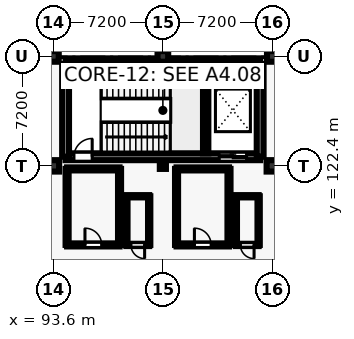
"""IFC4 building model, lengths in metres.
Left out: names, types, materials, properties, quantities, classifications, styles, units other than length and angle.
Written with IfcOpenShell. Run it as: python <this file> out.ifc"""

import sys

from ifc_helpers import new_model, si_unit, direction, frame, frame_2d, origin, origin_2d, place, context, subcontext, project, spatial, rectangle, hollow_rectangle, extrude, element, fill, save


model = new_model("IFC4")
c1 = context("Model", 3, precision=1e-05, world=origin(), true_north=direction((0.0, 1.0)))
c2 = subcontext(c1, "Body", "Model", "MODEL_VIEW")
j1 = project(units=[si_unit("LENGTHUNIT", "METRE"), si_unit("PLANEANGLEUNIT", "RADIAN")], contexts=[c1])
p1 = place(None, origin())
s1 = spatial("IfcSite", under=j1, at=p1, CompositionType="ELEMENT")
p2 = place(p1, origin())
s2 = spatial("IfcBuilding", under=s1, at=p2, CompositionType="ELEMENT")
p3 = place(p2, frame((0.0, 0.0, 9.6)))
s3 = spatial("IfcBuildingStorey", under=s2, at=p3, CompositionType="ELEMENT", Elevation=9.6)
p4 = place(p3, frame((93.6, 122.4, 0.0), z_axis=(0.0, 0.0, 1.0), x_axis=(1.0, 0.0, 0.0)))
e1 = element("IfcColumn", 1, at=p4, inside=s3, PredefinedType="COLUMN", context=c2, shape_type="SweptSolid", body=[
    extrude(rectangle(XDim=0.75, YDim=0.75, at=origin_2d()), origin(), (0.0, 0.0, 1.0), 4.2),
])
p5 = place(p3, frame((93.6, 129.6, 0.0), z_axis=(0.0, 0.0, 1.0), x_axis=(1.0, 0.0, 0.0)))
e2 = element("IfcColumn", 2, at=p5, inside=s3, PredefinedType="COLUMN", context=c2, shape_type="SweptSolid", body=[
    extrude(rectangle(XDim=0.7, YDim=0.7, at=origin_2d()), origin(), (0.0, 0.0, 1.0), 4.2),
])
p6 = place(p3, frame((100.8, 122.4, 0.0), z_axis=(0.0, 0.0, 1.0), x_axis=(1.0, 0.0, 0.0)))
e3 = element("IfcColumn", 3, at=p6, inside=s3, PredefinedType="COLUMN", context=c2, shape_type="SweptSolid", body=[
    extrude(hollow_rectangle(XDim=0.4, YDim=0.4, WallThickness=0.02, at=origin_2d()), origin(), (0.0, 0.0, 1.0), 4.2),
])
p7 = place(p3, frame((100.8, 129.6, 0.0), z_axis=(0.0, 0.0, 1.0), x_axis=(1.0, 0.0, 0.0)))
e4 = element("IfcColumn", 4, at=p7, inside=s3, PredefinedType="COLUMN", context=c2, shape_type="SweptSolid", body=[
    extrude(rectangle(XDim=0.7, YDim=0.7, at=origin_2d()), origin(), (0.0, 0.0, 1.0), 4.2),
])
p8 = place(p3, frame((108.0, 122.4, 0.0), z_axis=(0.0, 0.0, 1.0), x_axis=(1.0, 0.0, 0.0)))
e5 = element("IfcColumn", 5, at=p8, inside=s3, PredefinedType="COLUMN", context=c2, shape_type="SweptSolid", body=[
    extrude(rectangle(XDim=0.75, YDim=0.75, at=origin_2d()), origin(), (0.0, 0.0, 1.0), 4.2),
])
p9 = place(p3, frame((108.0, 129.6, 0.0), z_axis=(0.0, 0.0, 1.0), x_axis=(1.0, 0.0, 0.0)))
e6 = element("IfcColumn", 6, at=p9, inside=s3, PredefinedType="COLUMN", context=c2, shape_type="SweptSolid", body=[
    extrude(rectangle(XDim=0.7, YDim=0.7, at=origin_2d()), origin(), (0.0, 0.0, 1.0), 4.2),
])
p10 = place(p3, frame((94.4, 123.0, 0.0), z_axis=(0.0, 0.0, 1.0), x_axis=(1.0, 0.0, 0.0)))
e7 = element("IfcWall", 7, at=p10, inside=s3, PredefinedType="SHEAR", context=c2, shape_type="SweptSolid", body=[
    extrude(rectangle(XDim=12.8, YDim=0.45, at=frame_2d((6.4, 0.0))), origin(), (0.0, 0.0, 1.0), 3.88),
])
p11 = place(p10, frame((0.55, 0.0, 0.0)))
e8 = element("IfcOpeningElement", 8, at=p11, cuts=e7, PredefinedType="OPENING", context=c2, shape_type="SweptSolid", body=[
    extrude(rectangle(XDim=1.2, YDim=2.25, at=frame_2d((0.6, 1.125))), frame((0.0, 0.235, 0.0), z_axis=(0.0, -1.0, 0.0), x_axis=(1.0, 0.0, 0.0)), (0.0, 0.0, 1.0), 0.47),
])
p12 = place(p10, frame((10.108, 0.0, 0.0)))
e9 = element("IfcOpeningElement", 9, at=p12, cuts=e7, PredefinedType="OPENING", context=c2, shape_type="SweptSolid", body=[
    extrude(rectangle(XDim=1.8, YDim=2.4, at=frame_2d((0.9, 1.2))), frame((0.0, 0.235, 0.0), z_axis=(0.0, -1.0, 0.0), x_axis=(1.0, 0.0, 0.0)), (0.0, 0.0, 1.0), 0.47),
])
p13 = place(p3, frame((94.4, 129.1, 0.0), z_axis=(0.0, 0.0, 1.0), x_axis=(1.0, 0.0, 0.0)))
e10 = element("IfcWall", 10, at=p13, inside=s3, PredefinedType="SHEAR", context=c2, shape_type="SweptSolid", body=[
    extrude(rectangle(XDim=12.8, YDim=0.45, at=frame_2d((6.4, 0.0))), origin(), (0.0, 0.0, 1.0), 3.88),
])
for number, where, z_axis, x_axis in (
    (11, (94.4, 123.0, 0.0), (0.0, 0.0, 1.0), (0.0, 1.0, 0.0)),
    (12, (107.2, 123.0, 0.0), (0.0, 0.0, 1.0), (0.0, 1.0, 0.0)),
):
    element("IfcWall", number, at=place(p3, frame(where, z_axis=z_axis, x_axis=x_axis)), inside=s3, PredefinedType="SHEAR", context=c2, shape_type="SweptSolid", body=[
        extrude(rectangle(XDim=6.1, YDim=0.45, at=frame_2d((3.05, 0.0))), origin(), (0.0, 0.0, 1.0), 3.88),
    ])
p14 = place(p3, frame((103.616, 123.225, 0.0), z_axis=(0.0, 0.0, 1.0), x_axis=(0.0, 1.0, 0.0)))
e13 = element("IfcWall", 13, at=p14, inside=s3, PredefinedType="SHEAR", context=c2, shape_type="SweptSolid", body=[
    extrude(rectangle(XDim=5.65, YDim=0.35, at=frame_2d((2.825, 0.0))), origin(), (0.0, 0.0, 1.0), 3.88),
])
p15 = place(p3, frame((94.5, 117.2, 0.0), z_axis=(0.0, 0.0, 1.0), x_axis=(1.0, 0.0, 0.0)))
e14 = element("IfcWall", 14, at=p15, inside=s3, PredefinedType="PARTITIONING", context=c2, shape_type="SweptSolid", body=[
    extrude(rectangle(XDim=3.45, YDim=0.2, at=frame_2d((1.725, 0.0))), origin(), (0.0, 0.0, 1.0), 2.94),
])
p16 = place(p15, frame((1.175, 0.0, 0.0)))
e15 = element("IfcOpeningElement", 15, at=p16, cuts=e14, PredefinedType="OPENING", context=c2, shape_type="SweptSolid", body=[
    extrude(rectangle(XDim=1.1, YDim=2.25, at=frame_2d((0.55, 1.125))), frame((0.0, 0.11, 0.0), z_axis=(0.0, -1.0, 0.0), x_axis=(1.0, 0.0, 0.0)), (0.0, 0.0, 1.0), 0.22),
])
p17 = place(p3, frame((97.95, 117.2, 0.0), z_axis=(0.0, 0.0, 1.0), x_axis=(0.0, 1.0, 0.0)))
e16 = element("IfcWall", 16, at=p17, inside=s3, PredefinedType="PARTITIONING", context=c2, shape_type="SweptSolid", body=[
    extrude(rectangle(XDim=5.0, YDim=0.2, at=frame_2d((2.5, 0.0))), origin(), (0.0, 0.0, 1.0), 2.94),
])
p18 = place(p3, frame((97.95, 122.2, 0.0), z_axis=(0.0, 0.0, 1.0), x_axis=(-1.0, 0.0, 0.0)))
e17 = element("IfcWall", 17, at=p18, inside=s3, PredefinedType="PARTITIONING", context=c2, shape_type="SweptSolid", body=[
    extrude(rectangle(XDim=3.45, YDim=0.2, at=frame_2d((1.725, 0.0))), origin(), (0.0, 0.0, 1.0), 2.94),
])
p19 = place(p3, frame((94.5, 122.2, 0.0), z_axis=(0.0, 0.0, 1.0), x_axis=(0.0, -1.0, 0.0)))
e18 = element("IfcWall", 18, at=p19, inside=s3, PredefinedType="PARTITIONING", context=c2, shape_type="SweptSolid", body=[
    extrude(rectangle(XDim=5.0, YDim=0.2, at=frame_2d((2.5, 0.0))), origin(), (0.0, 0.0, 1.0), 2.94),
])
p20 = place(p3, frame((98.4, 117.2, 0.0), z_axis=(0.0, 0.0, 1.0), x_axis=(1.0, 0.0, 0.0)))
e19 = element("IfcWall", 19, at=p20, inside=s3, PredefinedType="PARTITIONING", context=c2, shape_type="SweptSolid", body=[
    extrude(rectangle(XDim=1.5, YDim=0.15, at=frame_2d((0.75, 0.0))), origin(), (0.0, 0.0, 1.0), 2.94),
])
p21 = place(p20, frame((0.3, 0.0, 0.0)))
e20 = element("IfcOpeningElement", 20, at=p21, cuts=e19, PredefinedType="OPENING", context=c2, shape_type="SweptSolid", body=[
    extrude(rectangle(XDim=0.9, YDim=2.15, at=frame_2d((0.45, 1.075))), frame((0.0, 0.085, 0.0), z_axis=(0.0, -1.0, 0.0), x_axis=(1.0, 0.0, 0.0)), (0.0, 0.0, 1.0), 0.17),
])
p22 = place(p3, frame((99.9, 117.2, 0.0), z_axis=(0.0, 0.0, 1.0), x_axis=(0.0, 1.0, 0.0)))
e21 = element("IfcWall", 21, at=p22, inside=s3, PredefinedType="PARTITIONING", context=c2, shape_type="SweptSolid", body=[
    extrude(rectangle(XDim=3.2, YDim=0.15, at=frame_2d((1.6, 0.0))), origin(), (0.0, 0.0, 1.0), 2.94),
])
p23 = place(p3, frame((99.9, 120.4, 0.0), z_axis=(0.0, 0.0, 1.0), x_axis=(-1.0, 0.0, 0.0)))
e22 = element("IfcWall", 22, at=p23, inside=s3, PredefinedType="PARTITIONING", context=c2, shape_type="SweptSolid", body=[
    extrude(rectangle(XDim=1.5, YDim=0.15, at=frame_2d((0.75, 0.0))), origin(), (0.0, 0.0, 1.0), 2.94),
])
p24 = place(p3, frame((98.4, 120.4, 0.0), z_axis=(0.0, 0.0, 1.0), x_axis=(0.0, -1.0, 0.0)))
e23 = element("IfcWall", 23, at=p24, inside=s3, PredefinedType="PARTITIONING", context=c2, shape_type="SweptSolid", body=[
    extrude(rectangle(XDim=3.2, YDim=0.15, at=frame_2d((1.6, 0.0))), origin(), (0.0, 0.0, 1.0), 2.94),
])
p25 = place(p3, frame((101.7, 117.2, 0.0), z_axis=(0.0, 0.0, 1.0), x_axis=(1.0, 0.0, 0.0)))
e24 = element("IfcWall", 24, at=p25, inside=s3, PredefinedType="PARTITIONING", context=c2, shape_type="SweptSolid", body=[
    extrude(rectangle(XDim=3.45, YDim=0.2, at=frame_2d((1.725, 0.0))), origin(), (0.0, 0.0, 1.0), 2.94),
])
p26 = place(p25, frame((1.175, 0.0, 0.0)))
e25 = element("IfcOpeningElement", 25, at=p26, cuts=e24, PredefinedType="OPENING", context=c2, shape_type="SweptSolid", body=[
    extrude(rectangle(XDim=1.1, YDim=2.25, at=frame_2d((0.55, 1.125))), frame((0.0, 0.11, 0.0), z_axis=(0.0, -1.0, 0.0), x_axis=(1.0, 0.0, 0.0)), (0.0, 0.0, 1.0), 0.22),
])
p27 = place(p3, frame((105.15, 117.2, 0.0), z_axis=(0.0, 0.0, 1.0), x_axis=(0.0, 1.0, 0.0)))
e26 = element("IfcWall", 26, at=p27, inside=s3, PredefinedType="PARTITIONING", context=c2, shape_type="SweptSolid", body=[
    extrude(rectangle(XDim=5.0, YDim=0.2, at=frame_2d((2.5, 0.0))), origin(), (0.0, 0.0, 1.0), 2.94),
])
p28 = place(p3, frame((105.15, 122.2, 0.0), z_axis=(0.0, 0.0, 1.0), x_axis=(-1.0, 0.0, 0.0)))
e27 = element("IfcWall", 27, at=p28, inside=s3, PredefinedType="PARTITIONING", context=c2, shape_type="SweptSolid", body=[
    extrude(rectangle(XDim=3.45, YDim=0.2, at=frame_2d((1.725, 0.0))), origin(), (0.0, 0.0, 1.0), 2.94),
])
p29 = place(p3, frame((101.7, 122.2, 0.0), z_axis=(0.0, 0.0, 1.0), x_axis=(0.0, -1.0, 0.0)))
e28 = element("IfcWall", 28, at=p29, inside=s3, PredefinedType="PARTITIONING", context=c2, shape_type="SweptSolid", body=[
    extrude(rectangle(XDim=5.0, YDim=0.2, at=frame_2d((2.5, 0.0))), origin(), (0.0, 0.0, 1.0), 2.94),
])
p30 = place(p3, frame((105.6, 117.2, 0.0), z_axis=(0.0, 0.0, 1.0), x_axis=(1.0, 0.0, 0.0)))
e29 = element("IfcWall", 29, at=p30, inside=s3, PredefinedType="PARTITIONING", context=c2, shape_type="SweptSolid", body=[
    extrude(rectangle(XDim=1.5, YDim=0.15, at=frame_2d((0.75, 0.0))), origin(), (0.0, 0.0, 1.0), 2.94),
])
p31 = place(p30, frame((0.3, 0.0, 0.0)))
e30 = element("IfcOpeningElement", 30, at=p31, cuts=e29, PredefinedType="OPENING", context=c2, shape_type="SweptSolid", body=[
    extrude(rectangle(XDim=0.9, YDim=2.15, at=frame_2d((0.45, 1.075))), frame((0.0, 0.085, 0.0), z_axis=(0.0, -1.0, 0.0), x_axis=(1.0, 0.0, 0.0)), (0.0, 0.0, 1.0), 0.17),
])
p32 = place(p3, frame((107.1, 117.2, 0.0), z_axis=(0.0, 0.0, 1.0), x_axis=(0.0, 1.0, 0.0)))
e31 = element("IfcWall", 31, at=p32, inside=s3, PredefinedType="PARTITIONING", context=c2, shape_type="SweptSolid", body=[
    extrude(rectangle(XDim=3.2, YDim=0.15, at=frame_2d((1.6, 0.0))), origin(), (0.0, 0.0, 1.0), 2.94),
])
p33 = place(p3, frame((107.1, 120.4, 0.0), z_axis=(0.0, 0.0, 1.0), x_axis=(-1.0, 0.0, 0.0)))
e32 = element("IfcWall", 32, at=p33, inside=s3, PredefinedType="PARTITIONING", context=c2, shape_type="SweptSolid", body=[
    extrude(rectangle(XDim=1.5, YDim=0.15, at=frame_2d((0.75, 0.0))), origin(), (0.0, 0.0, 1.0), 2.94),
])
p34 = place(p3, frame((105.6, 120.4, 0.0), z_axis=(0.0, 0.0, 1.0), x_axis=(0.0, -1.0, 0.0)))
e33 = element("IfcWall", 33, at=p34, inside=s3, PredefinedType="PARTITIONING", context=c2, shape_type="SweptSolid", body=[
    extrude(rectangle(XDim=3.2, YDim=0.15, at=frame_2d((1.6, 0.0))), origin(), (0.0, 0.0, 1.0), 2.94),
])
p35 = place(p11, origin())
e34 = element("IfcDoor", 34, at=p35, inside=s3, OperationType="SINGLE_SWING_RIGHT", PredefinedType="DOOR", context=c2, shape_type="SweptSolid", body=[
    extrude(rectangle(XDim=1.2, YDim=2.25, at=frame_2d((0.6, 1.125))), frame((0.0, 0.025, 0.0), z_axis=(0.0, -1.0, 0.0), x_axis=(1.0, 0.0, 0.0)), (0.0, 0.0, 1.0), 0.05),
])
fill(e8, e34)
p36 = place(p12, origin())
e35 = element("IfcDoor", 35, at=p36, inside=s3, OperationType="SLIDING_TO_LEFT", PredefinedType="DOOR", context=c2, shape_type="SweptSolid", body=[
    extrude(rectangle(XDim=1.8, YDim=2.4, at=frame_2d((0.9, 1.2))), frame((0.0, 0.025, 0.0), z_axis=(0.0, -1.0, 0.0), x_axis=(1.0, 0.0, 0.0)), (0.0, 0.0, 1.0), 0.05),
])
fill(e9, e35)
p37 = place(p16, origin())
e36 = element("IfcDoor", 36, at=p37, inside=s3, OperationType="SINGLE_SWING_LEFT", PredefinedType="DOOR", context=c2, shape_type="SweptSolid", body=[
    extrude(rectangle(XDim=1.1, YDim=2.25, at=frame_2d((0.55, 1.125))), frame((0.0, 0.025, 0.0), z_axis=(0.0, -1.0, 0.0), x_axis=(1.0, 0.0, 0.0)), (0.0, 0.0, 1.0), 0.05),
])
fill(e15, e36)
p38 = place(p21, frame((0.9, 0.0, 0.0), z_axis=(0.0, 0.0, 1.0), x_axis=(-1.0, 0.0, 0.0)))
e37 = element("IfcDoor", 37, at=p38, inside=s3, OperationType="SINGLE_SWING_RIGHT", PredefinedType="DOOR", context=c2, shape_type="SweptSolid", body=[
    extrude(rectangle(XDim=0.9, YDim=2.15, at=frame_2d((0.45, 1.075))), frame((0.0, 0.025, 0.0), z_axis=(0.0, -1.0, 0.0), x_axis=(1.0, 0.0, 0.0)), (0.0, 0.0, 1.0), 0.05),
])
fill(e20, e37)
p39 = place(p26, origin())
e38 = element("IfcDoor", 38, at=p39, inside=s3, OperationType="SINGLE_SWING_LEFT", PredefinedType="DOOR", context=c2, shape_type="SweptSolid", body=[
    extrude(rectangle(XDim=1.1, YDim=2.25, at=frame_2d((0.55, 1.125))), frame((0.0, 0.025, 0.0), z_axis=(0.0, -1.0, 0.0), x_axis=(1.0, 0.0, 0.0)), (0.0, 0.0, 1.0), 0.05),
])
fill(e25, e38)
p40 = place(p31, frame((0.9, 0.0, 0.0), z_axis=(0.0, 0.0, 1.0), x_axis=(-1.0, 0.0, 0.0)))
e39 = element("IfcDoor", 39, at=p40, inside=s3, OperationType="SINGLE_SWING_RIGHT", PredefinedType="DOOR", context=c2, shape_type="SweptSolid", body=[
    extrude(rectangle(XDim=0.9, YDim=2.15, at=frame_2d((0.45, 1.075))), frame((0.0, 0.025, 0.0), z_axis=(0.0, -1.0, 0.0), x_axis=(1.0, 0.0, 0.0)), (0.0, 0.0, 1.0), 0.05),
])
fill(e30, e39)
save(model, sys.argv[1])
